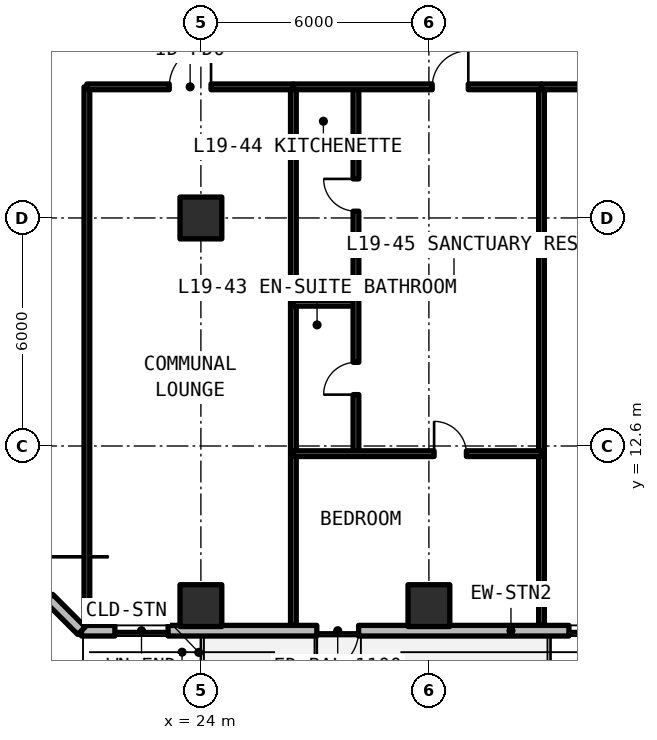
"""IFC4 building model, lengths in metres.
Left out: names, types, materials, properties, quantities, classifications, styles, units other than length and angle.
Written with IfcOpenShell. Run it as: python <this file> out.ifc"""

import sys

from ifc_helpers import new_model, si_unit, direction, frame, frame_2d, origin, origin_2d, place, context, subcontext, project, spatial, rectangle, extrude, element, fill, save


model = new_model("IFC4")
c1 = context("Model", 3, precision=1e-05, world=origin(), true_north=direction((0.0, 1.0)))
c2 = subcontext(c1, "Body", "Model", "MODEL_VIEW")
j1 = project(units=[si_unit("LENGTHUNIT", "METRE"), si_unit("PLANEANGLEUNIT", "RADIAN")], contexts=[c1])
p1 = place(None, origin())
s1 = spatial("IfcSite", under=j1, at=p1, CompositionType="ELEMENT")
p2 = place(p1, origin())
s2 = spatial("IfcBuilding", under=s1, at=p2, CompositionType="ELEMENT")
p3 = place(p2, frame((0.0, 0.0, 69.63)))
s3 = spatial("IfcBuildingStorey", under=s2, at=p3, CompositionType="ELEMENT", Elevation=69.63)
for number, where, z_axis, x_axis in (
    (1, (24.0, 18.6, 0.0), (0.0, 0.0, 1.0), (1.0, 0.0, 0.0)),
    (2, (24.0, 8.4, 0.0), (0.0, 0.0, 1.0), (1.0, 0.0, 0.0)),
    (3, (30.0, 8.4, 0.0), (0.0, 0.0, 1.0), (1.0, 0.0, 0.0)),
):
    element("IfcColumn", number, at=place(p3, frame(where, z_axis=z_axis, x_axis=x_axis)), inside=s3, PredefinedType="COLUMN", context=c2, shape_type="SweptSolid", body=[
        extrude(rectangle(XDim=1.1, YDim=1.1, at=origin_2d()), origin(), (0.0, 0.0, 1.0), 3.63),
    ])
p4 = place(p3, frame((20.858, 7.74, 0.0), z_axis=(0.0, 0.0, 1.0), x_axis=(1.0, 0.0, 0.0)))
e4 = element("IfcWall", 4, at=p4, inside=s3, PredefinedType="SOLIDWALL", context=c2, shape_type="SweptSolid", body=[
    extrude(rectangle(XDim=22.602, YDim=0.28, at=frame_2d((11.301, 0.0))), origin(), (0.0, 0.0, 1.0), 3.35),
])
p5 = place(p4, frame((6.192, 0.0, 0.0)))
e5 = element("IfcOpeningElement", 5, at=p5, cuts=e4, PredefinedType="OPENING", context=c2, shape_type="SweptSolid", body=[
    extrude(rectangle(XDim=1.1, YDim=2.15, at=frame_2d((0.55, 1.075))), frame((0.0, 0.15, 0.0), z_axis=(0.0, -1.0, 0.0), x_axis=(1.0, 0.0, 0.0)), (0.0, 0.0, 1.0), 0.3),
])
p6 = place(p4, frame((0.879, 0.0, 0.78)))
e6 = element("IfcOpeningElement", 6, at=p6, cuts=e4, PredefinedType="OPENING", context=c2, shape_type="SweptSolid", body=[
    extrude(rectangle(XDim=1.4, YDim=1.65, at=frame_2d((0.7, 0.825))), frame((0.0, 0.15, 0.0), z_axis=(0.0, -1.0, 0.0), x_axis=(1.0, 0.0, 0.0)), (0.0, 0.0, 1.0), 0.3),
])
p7 = place(p4, frame((12.827, 0.0, 0.78)))
e7 = element("IfcOpeningElement", 7, at=p7, cuts=e4, PredefinedType="OPENING", context=c2, shape_type="SweptSolid", body=[
    extrude(rectangle(XDim=1.4, YDim=1.65, at=frame_2d((0.7, 0.825))), frame((0.0, 0.15, 0.0), z_axis=(0.0, -1.0, 0.0), x_axis=(1.0, 0.0, 0.0)), (0.0, 0.0, 1.0), 0.3),
])
p8 = place(p4, frame((18.165, 0.0, 0.78)))
e8 = element("IfcOpeningElement", 8, at=p8, cuts=e4, PredefinedType="OPENING", context=c2, shape_type="SweptSolid", body=[
    extrude(rectangle(XDim=2.2, YDim=1.66, at=frame_2d((1.1, 0.83))), frame((0.0, 0.15, 0.0), z_axis=(0.0, -1.0, 0.0), x_axis=(1.0, 0.0, 0.0)), (0.0, 0.0, 1.0), 0.3),
])
p9 = place(p3, frame((16.74, 11.858, 0.0), z_axis=(0.0, 0.0, 1.0), x_axis=(0.707106781187, -0.707106781187, 0.0)))
e9 = element("IfcWall", 9, at=p9, inside=s3, PredefinedType="SOLIDWALL", context=c2, shape_type="SweptSolid", body=[
    extrude(rectangle(XDim=5.824, YDim=0.28, at=frame_2d((2.912, 0.0))), origin(), (0.0, 0.0, 1.0), 3.35),
])
p10 = place(p9, frame((1.212, 0.0, 0.78)))
e10 = element("IfcOpeningElement", 10, at=p10, cuts=e9, PredefinedType="OPENING", context=c2, shape_type="SweptSolid", body=[
    extrude(rectangle(XDim=3.4, YDim=1.66, at=frame_2d((1.7, 0.83))), frame((0.0, 0.15, 0.0), z_axis=(0.0, -1.0, 0.0), x_axis=(1.0, 0.0, 0.0)), (0.0, 0.0, 1.0), 0.3),
])
for number, where, z_axis, x_axis in (
    (11, (21.0, 7.88, 0.0), (0.0, 0.0, 1.0), (0.0, 1.0, 0.0)),
    (12, (26.434, 7.88, 0.0), (0.0, 0.0, 1.0), (0.0, 1.0, 0.0)),
):
    element("IfcWall", number, at=place(p3, frame(where, z_axis=z_axis, x_axis=x_axis)), inside=s3, PredefinedType="SOLIDWALL", context=c2, shape_type="SweptSolid", body=[
        extrude(rectangle(XDim=14.17, YDim=0.15, at=frame_2d((7.085, 0.0))), origin(), (0.0, 0.0, 1.0), 2.57),
    ])
p11 = place(p3, frame((21.0, 22.05, 0.0), z_axis=(0.0, 0.0, 1.0), x_axis=(1.0, 0.0, 0.0)))
e13 = element("IfcWall", 13, at=p11, inside=s3, PredefinedType="SOLIDWALL", context=c2, shape_type="SweptSolid", body=[
    extrude(rectangle(XDim=5.434, YDim=0.15, at=frame_2d((2.717, 0.0))), origin(), (0.0, 0.0, 1.0), 2.57),
])
p12 = place(p11, frame((2.167, 0.0, 0.0)))
e14 = element("IfcOpeningElement", 14, at=p12, cuts=e13, PredefinedType="OPENING", context=c2, shape_type="SweptSolid", body=[
    extrude(rectangle(XDim=1.1, YDim=2.15, at=frame_2d((0.55, 1.075))), frame((0.0, 0.085, 0.0), z_axis=(0.0, -1.0, 0.0), x_axis=(1.0, 0.0, 0.0)), (0.0, 0.0, 1.0), 0.17),
])
p13 = place(p3, frame((32.963, 7.88, 0.0), z_axis=(0.0, 0.0, 1.0), x_axis=(0.0, 1.0, 0.0)))
e15 = element("IfcWall", 15, at=p13, inside=s3, PredefinedType="SOLIDWALL", context=c2, shape_type="SweptSolid", body=[
    extrude(rectangle(XDim=14.17, YDim=0.15, at=frame_2d((7.085, 0.0))), origin(), (0.0, 0.0, 1.0), 2.57),
])
p14 = place(p3, frame((26.434, 16.355, 0.0), z_axis=(0.0, 0.0, 1.0), x_axis=(1.0, 0.0, 0.0)))
e16 = element("IfcWall", 16, at=p14, inside=s3, PredefinedType="PARTITIONING", context=c2, shape_type="SweptSolid", body=[
    extrude(rectangle(XDim=1.646, YDim=0.15, at=frame_2d((0.823, 0.0))), origin(), (0.0, 0.0, 1.0), 2.57),
])
p15 = place(p3, frame((28.08, 12.398, 0.0), z_axis=(0.0, 0.0, 1.0), x_axis=(0.0, 1.0, 0.0)))
e17 = element("IfcWall", 17, at=p15, inside=s3, PredefinedType="PARTITIONING", context=c2, shape_type="SweptSolid", body=[
    extrude(rectangle(XDim=9.652, YDim=0.15, at=frame_2d((4.826, 0.0))), origin(), (0.0, 0.0, 1.0), 2.57),
])
p16 = place(p15, frame((1.554, 0.0, 0.0)))
e18 = element("IfcOpeningElement", 18, at=p16, cuts=e17, PredefinedType="OPENING", context=c2, shape_type="SweptSolid", body=[
    extrude(rectangle(XDim=0.85, YDim=2.1, at=frame_2d((0.425, 1.05))), frame((0.0, 0.085, 0.0), z_axis=(0.0, -1.0, 0.0), x_axis=(1.0, 0.0, 0.0)), (0.0, 0.0, 1.0), 0.17),
])
p17 = place(p15, frame((6.38, 0.0, 0.0)))
e19 = element("IfcOpeningElement", 19, at=p17, cuts=e17, PredefinedType="OPENING", context=c2, shape_type="SweptSolid", body=[
    extrude(rectangle(XDim=0.85, YDim=2.1, at=frame_2d((0.425, 1.05))), frame((0.0, 0.085, 0.0), z_axis=(0.0, -1.0, 0.0), x_axis=(1.0, 0.0, 0.0)), (0.0, 0.0, 1.0), 0.17),
])
p18 = place(p3, frame((26.434, 12.398, 0.0), z_axis=(0.0, 0.0, 1.0), x_axis=(1.0, 0.0, 0.0)))
e20 = element("IfcWall", 20, at=p18, inside=s3, PredefinedType="PARTITIONING", context=c2, shape_type="SweptSolid", body=[
    extrude(rectangle(XDim=6.529, YDim=0.15, at=frame_2d((3.265, 0.0))), origin(), (0.0, 0.0, 1.0), 2.57),
])
p19 = place(p18, frame((3.703, 0.0, 0.0)))
e21 = element("IfcOpeningElement", 21, at=p19, cuts=e20, PredefinedType="OPENING", context=c2, shape_type="SweptSolid", body=[
    extrude(rectangle(XDim=0.85, YDim=2.1, at=frame_2d((0.425, 1.05))), frame((0.0, 0.085, 0.0), z_axis=(0.0, -1.0, 0.0), x_axis=(1.0, 0.0, 0.0)), (0.0, 0.0, 1.0), 0.17),
])
p20 = place(p3, frame((26.434, 22.05, 0.0), z_axis=(0.0, 0.0, 1.0), x_axis=(1.0, 0.0, 0.0)))
e22 = element("IfcWall", 22, at=p20, inside=s3, PredefinedType="SOLIDWALL", context=c2, shape_type="SweptSolid", body=[
    extrude(rectangle(XDim=6.529, YDim=0.15, at=frame_2d((3.265, 0.0))), origin(), (0.0, 0.0, 1.0), 2.57),
])
p21 = place(p20, frame((3.653, 0.0, 0.0)))
e23 = element("IfcOpeningElement", 23, at=p21, cuts=e22, PredefinedType="OPENING", context=c2, shape_type="SweptSolid", body=[
    extrude(rectangle(XDim=0.95, YDim=2.15, at=frame_2d((0.475, 1.075))), frame((0.0, 0.085, 0.0), z_axis=(0.0, -1.0, 0.0), x_axis=(1.0, 0.0, 0.0)), (0.0, 0.0, 1.0), 0.17),
])
p22 = place(p3, frame((32.963, 22.05, 0.0), z_axis=(0.0, 0.0, 1.0), x_axis=(1.0, 0.0, 0.0)))
e24 = element("IfcWall", 24, at=p22, inside=s3, PredefinedType="SOLIDWALL", context=c2, shape_type="SweptSolid", body=[
    extrude(rectangle(XDim=5.083, YDim=0.15, at=frame_2d((2.542, 0.0))), origin(), (0.0, 0.0, 1.0), 2.57),
])
p23 = place(p22, frame((2.067, 0.0, 0.0)))
e25 = element("IfcOpeningElement", 25, at=p23, cuts=e24, PredefinedType="OPENING", context=c2, shape_type="SweptSolid", body=[
    extrude(rectangle(XDim=0.95, YDim=2.15, at=frame_2d((0.475, 1.075))), frame((0.0, 0.085, 0.0), z_axis=(0.0, -1.0, 0.0), x_axis=(1.0, 0.0, 0.0)), (0.0, 0.0, 1.0), 0.17),
])
p24 = place(p5, frame((1.1, 0.0, 0.0), z_axis=(0.0, 0.0, 1.0), x_axis=(-1.0, 0.0, 0.0)))
e26 = element("IfcDoor", 26, at=p24, inside=s3, OperationType="SINGLE_SWING_RIGHT", PredefinedType="DOOR", context=c2, shape_type="SweptSolid", body=[
    extrude(rectangle(XDim=1.1, YDim=2.15, at=frame_2d((0.55, 1.075))), frame((0.0, 0.025, 0.0), z_axis=(0.0, -1.0, 0.0), x_axis=(1.0, 0.0, 0.0)), (0.0, 0.0, 1.0), 0.05),
])
fill(e5, e26)
p25 = place(p6, origin())
e27 = element("IfcWindow", 27, at=p25, inside=s3, PartitioningType="SINGLE_PANEL", PredefinedType="WINDOW", context=c2, shape_type="SweptSolid", body=[
    extrude(rectangle(XDim=1.4, YDim=1.65, at=frame_2d((0.7, 0.825))), frame((0.0, 0.03, 0.0), z_axis=(0.0, -1.0, 0.0), x_axis=(1.0, 0.0, 0.0)), (0.0, 0.0, 1.0), 0.06),
])
fill(e6, e27)
p26 = place(p7, origin())
e28 = element("IfcWindow", 28, at=p26, inside=s3, PartitioningType="SINGLE_PANEL", PredefinedType="WINDOW", context=c2, shape_type="SweptSolid", body=[
    extrude(rectangle(XDim=1.4, YDim=1.65, at=frame_2d((0.7, 0.825))), frame((0.0, 0.03, 0.0), z_axis=(0.0, -1.0, 0.0), x_axis=(1.0, 0.0, 0.0)), (0.0, 0.0, 1.0), 0.06),
])
fill(e7, e28)
p27 = place(p12, origin())
e29 = element("IfcDoor", 29, at=p27, inside=s3, OperationType="SINGLE_SWING_RIGHT", PredefinedType="DOOR", context=c2, shape_type="SweptSolid", body=[
    extrude(rectangle(XDim=1.1, YDim=2.15, at=frame_2d((0.55, 1.075))), frame((0.0, 0.025, 0.0), z_axis=(0.0, -1.0, 0.0), x_axis=(1.0, 0.0, 0.0)), (0.0, 0.0, 1.0), 0.05),
])
fill(e14, e29)
p28 = place(p16, origin())
e30 = element("IfcDoor", 30, at=p28, inside=s3, OperationType="SINGLE_SWING_LEFT", PredefinedType="DOOR", context=c2, shape_type="SweptSolid", body=[
    extrude(rectangle(XDim=0.85, YDim=2.1, at=frame_2d((0.425, 1.05))), frame((0.0, 0.025, 0.0), z_axis=(0.0, -1.0, 0.0), x_axis=(1.0, 0.0, 0.0)), (0.0, 0.0, 1.0), 0.05),
])
fill(e18, e30)
p29 = place(p17, origin())
e31 = element("IfcDoor", 31, at=p29, inside=s3, OperationType="SINGLE_SWING_RIGHT", PredefinedType="DOOR", context=c2, shape_type="SweptSolid", body=[
    extrude(rectangle(XDim=0.85, YDim=2.1, at=frame_2d((0.425, 1.05))), frame((0.0, 0.025, 0.0), z_axis=(0.0, -1.0, 0.0), x_axis=(1.0, 0.0, 0.0)), (0.0, 0.0, 1.0), 0.05),
])
fill(e19, e31)
p30 = place(p19, origin())
e32 = element("IfcDoor", 32, at=p30, inside=s3, OperationType="SINGLE_SWING_LEFT", PredefinedType="DOOR", context=c2, shape_type="SweptSolid", body=[
    extrude(rectangle(XDim=0.85, YDim=2.1, at=frame_2d((0.425, 1.05))), frame((0.0, 0.025, 0.0), z_axis=(0.0, -1.0, 0.0), x_axis=(1.0, 0.0, 0.0)), (0.0, 0.0, 1.0), 0.05),
])
fill(e21, e32)
p31 = place(p21, origin())
e33 = element("IfcDoor", 33, at=p31, inside=s3, OperationType="SINGLE_SWING_RIGHT", PredefinedType="DOOR", context=c2, shape_type="SweptSolid", body=[
    extrude(rectangle(XDim=0.95, YDim=2.15, at=frame_2d((0.475, 1.075))), frame((0.0, 0.025, 0.0), z_axis=(0.0, -1.0, 0.0), x_axis=(1.0, 0.0, 0.0)), (0.0, 0.0, 1.0), 0.05),
])
fill(e23, e33)
save(model, sys.argv[1])
